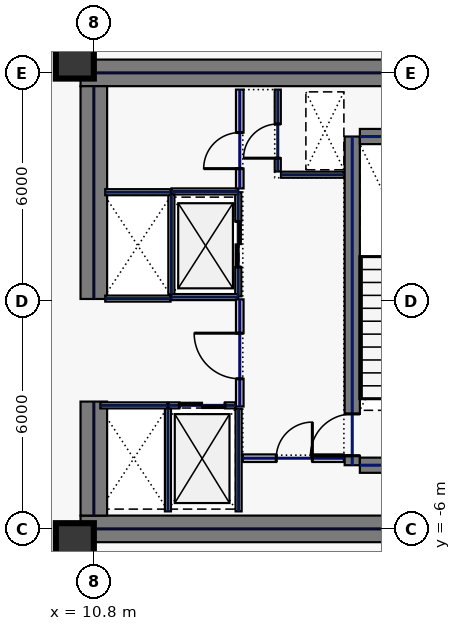
"""IFC4 building model, lengths in metres.
Left out: names, types, materials, properties, quantities, classifications, styles, units other than length and angle.
Written with IfcOpenShell. Run it as: python <this file> out.ifc"""

import sys

from ifc_helpers import new_model, si_unit, direction, frame, frame_2d, origin, origin_2d, place, context, subcontext, project, spatial, rectangle, hollow_rectangle, extrude, element, fill, save


model = new_model("IFC4")
c1 = context("Model", 3, precision=1e-05, world=origin(), true_north=direction((0.0, 1.0)))
c2 = subcontext(c1, "Body", "Model", "MODEL_VIEW")
j1 = project(units=[si_unit("LENGTHUNIT", "METRE"), si_unit("PLANEANGLEUNIT", "RADIAN")], contexts=[c1])
p1 = place(None, origin())
s1 = spatial("IfcSite", under=j1, at=p1, CompositionType="ELEMENT")
p2 = place(p1, origin())
s2 = spatial("IfcBuilding", under=s1, at=p2, CompositionType="ELEMENT")
p3 = place(p2, frame((0.0, 0.0, 97.4)))
s3 = spatial("IfcBuildingStorey", under=s2, at=p3, CompositionType="ELEMENT", Elevation=97.4)
for number, where, z_axis, x_axis in (
    (1, (10.45, 6.0, 0.0), (0.0, 0.0, 1.0), (1.0, 0.0, 0.0)),
    (2, (10.45, -6.0, 0.0), (0.0, 0.0, 1.0), (1.0, 0.0, 0.0)),
):
    element("IfcWall", number, at=place(p3, frame(where, z_axis=z_axis, x_axis=x_axis)), inside=s3, PredefinedType="SHEAR", context=c2, shape_type="SweptSolid", body=[
        extrude(rectangle(XDim=11.55, YDim=0.7, at=frame_2d((5.775, 0.0))), origin(), (0.0, 0.0, 1.0), 3.74),
    ])
p4 = place(p3, frame((10.8, -5.65, 0.0), z_axis=(0.0, 0.0, 1.0), x_axis=(0.0, 1.0, 0.0)))
e3 = element("IfcWall", 3, at=p4, inside=s3, PredefinedType="SHEAR", context=c2, shape_type="SweptSolid", body=[
    extrude(rectangle(XDim=3.0, YDim=0.7, at=frame_2d((1.5, 0.0))), origin(), (0.0, 0.0, 1.0), 3.74),
])
p5 = place(p3, frame((10.8, 0.05, 0.0), z_axis=(0.0, 0.0, 1.0), x_axis=(0.0, 1.0, 0.0)))
e4 = element("IfcWall", 4, at=p5, inside=s3, PredefinedType="SHEAR", context=c2, shape_type="SweptSolid", body=[
    extrude(rectangle(XDim=5.6, YDim=0.7, at=frame_2d((2.8, 0.0))), origin(), (0.0, 0.0, 1.0), 3.74),
])
p6 = place(p3, frame((17.6, -4.325, 0.0), z_axis=(0.0, 0.0, 1.0), x_axis=(0.0, 1.0, 0.0)))
e5 = element("IfcWall", 5, at=p6, inside=s3, PredefinedType="SHEAR", context=c2, shape_type="SweptSolid", body=[
    extrude(rectangle(XDim=8.65, YDim=0.4, at=frame_2d((4.325, 0.0))), origin(), (0.0, 0.0, 1.0), 3.74),
])
p7 = place(p6, frame((0.25, 0.0, 0.0)))
e6 = element("IfcOpeningElement", 6, at=p7, cuts=e5, PredefinedType="OPENING", context=c2, shape_type="SweptSolid", body=[
    extrude(rectangle(XDim=1.1, YDim=2.2, at=frame_2d((0.55, 1.1))), frame((0.0, 0.21, 0.0), z_axis=(0.0, -1.0, 0.0), x_axis=(1.0, 0.0, 0.0)), (0.0, 0.0, 1.0), 0.42),
])
for number, where, z_axis, x_axis in (
    (7, (17.8, -4.325, 0.0), (0.0, 0.0, 1.0), (1.0, 0.0, 0.0)),
    (8, (17.8, 4.325, 0.0), (0.0, 0.0, 1.0), (1.0, 0.0, 0.0)),
):
    element("IfcWall", number, at=place(p3, frame(where, z_axis=z_axis, x_axis=x_axis)), inside=s3, PredefinedType="SHEAR", context=c2, shape_type="SweptSolid", body=[
        extrude(rectangle(XDim=3.4, YDim=0.4, at=frame_2d((1.7, 0.0))), origin(), (0.0, 0.0, 1.0), 3.74),
    ])
for number, where, z_axis, x_axis in (
    (9, (10.3, -6.35, 0.0), (0.0, 0.0, 1.0), (1.0, 0.0, 0.0)),
    (10, (10.3, 6.35, 0.0), (0.0, 0.0, 1.0), (1.0, 0.0, 0.0)),
):
    element("IfcColumn", number, at=place(p3, frame(where, z_axis=z_axis, x_axis=x_axis)), inside=s3, PredefinedType="COLUMN", context=c2, shape_type="SweptSolid", body=[
        extrude(hollow_rectangle(XDim=1.0, YDim=1.0, WallThickness=0.045, at=origin_2d()), origin(), (0.0, 0.0, 1.0), 3.74),
    ])
p8 = place(p3, frame((14.6, 0.12, 0.0), z_axis=(0.0, 0.0, 1.0), x_axis=(0.0, 1.0, 0.0)))
e11 = element("IfcWall", 11, at=p8, inside=s3, PredefinedType="PARTITIONING", context=c2, shape_type="SweptSolid", body=[
    extrude(rectangle(XDim=2.74, YDim=0.16, at=frame_2d((1.37, 0.0))), origin(), (0.0, 0.0, 1.0), 3.74),
])
p9 = place(p8, frame((0.77, 0.0, 0.0)))
e12 = element("IfcOpeningElement", 12, at=p9, cuts=e11, PredefinedType="OPENING", context=c2, shape_type="SweptSolid", body=[
    extrude(rectangle(XDim=1.2, YDim=2.2, at=frame_2d((0.6, 1.1))), frame((0.0, 0.09, 0.0), z_axis=(0.0, -1.0, 0.0), x_axis=(1.0, 0.0, 0.0)), (0.0, 0.0, 1.0), 0.18),
])
for number, where, z_axis, x_axis in (
    (13, (12.84, 0.1, 0.0), (0.0, 0.0, 1.0), (1.0, 0.0, 0.0)),
    (14, (12.84, 2.88, 0.0), (0.0, 0.0, 1.0), (1.0, 0.0, 0.0)),
):
    element("IfcWall", number, at=place(p3, frame(where, z_axis=z_axis, x_axis=x_axis)), inside=s3, PredefinedType="PARTITIONING", context=c2, shape_type="SweptSolid", body=[
        extrude(rectangle(XDim=1.76, YDim=0.16, at=frame_2d((0.88, 0.0))), origin(), (0.0, 0.0, 1.0), 3.74),
    ])
p10 = place(p3, frame((12.84, 0.18, 0.0), z_axis=(0.0, 0.0, 1.0), x_axis=(0.0, 1.0, 0.0)))
e15 = element("IfcWall", 15, at=p10, inside=s3, PredefinedType="PARTITIONING", context=c2, shape_type="SweptSolid", body=[
    extrude(rectangle(XDim=2.62, YDim=0.16, at=frame_2d((1.31, 0.0))), origin(), (0.0, 0.0, 1.0), 3.74),
])
p11 = place(p3, frame((12.77, -2.75, 0.0), z_axis=(0.0, 0.0, 1.0), x_axis=(1.0, 0.0, 0.0)))
e16 = element("IfcWall", 16, at=p11, inside=s3, PredefinedType="PARTITIONING", context=c2, shape_type="SweptSolid", body=[
    extrude(rectangle(XDim=1.76, YDim=0.16, at=frame_2d((0.88, 0.0))), origin(), (0.0, 0.0, 1.0), 3.74),
])
p12 = place(p11, frame((0.28, 0.0, 0.0)))
e17 = element("IfcOpeningElement", 17, at=p12, cuts=e16, PredefinedType="OPENING", context=c2, shape_type="SweptSolid", body=[
    extrude(rectangle(XDim=1.2, YDim=2.2, at=frame_2d((0.6, 1.1))), frame((0.0, 0.09, 0.0), z_axis=(0.0, -1.0, 0.0), x_axis=(1.0, 0.0, 0.0)), (0.0, 0.0, 1.0), 0.18),
])
for number, where, z_axis, x_axis in (
    (18, (12.75, -5.54, 0.0), (0.0, 0.0, 1.0), (0.0, 1.0, 0.0)),
    (19, (14.61, -5.54, 0.0), (0.0, 0.0, 1.0), (0.0, 1.0, 0.0)),
):
    element("IfcWall", number, at=place(p3, frame(where, z_axis=z_axis, x_axis=x_axis)), inside=s3, PredefinedType="PARTITIONING", context=c2, shape_type="SweptSolid", body=[
        extrude(rectangle(XDim=2.7, YDim=0.16, at=frame_2d((1.35, 0.0))), origin(), (0.0, 0.0, 1.0), 3.74),
    ])
p13 = place(p3, frame((10.97, -2.75, 0.0), z_axis=(0.0, 0.0, 1.0), x_axis=(1.0, 0.0, 0.0)))
e20 = element("IfcWall", 20, at=p13, inside=s3, PredefinedType="PARTITIONING", context=c2, shape_type="SweptSolid", body=[
    extrude(rectangle(XDim=1.76, YDim=0.16, at=frame_2d((0.88, 0.0))), origin(), (0.0, 0.0, 1.0), 3.74),
])
for number, where, z_axis, x_axis in (
    (21, (11.1, 0.06, 0.0), (0.0, 0.0, 1.0), (1.0, 0.0, 0.0)),
    (22, (11.1, 2.86, 0.0), (0.0, 0.0, 1.0), (1.0, 0.0, 0.0)),
):
    element("IfcWall", number, at=place(p3, frame(where, z_axis=z_axis, x_axis=x_axis)), inside=s3, PredefinedType="PARTITIONING", context=c2, shape_type="SweptSolid", body=[
        extrude(rectangle(XDim=1.72, YDim=0.16, at=frame_2d((0.86, 0.0))), origin(), (0.0, 0.0, 1.0), 3.74),
    ])
p14 = place(p3, frame((15.64, 3.405, 0.0), z_axis=(0.0, 0.0, 1.0), x_axis=(0.0, 1.0, 0.0)))
e23 = element("IfcWall", 23, at=p14, inside=s3, PredefinedType="PARTITIONING", context=c2, shape_type="SweptSolid", body=[
    extrude(rectangle(XDim=2.155, YDim=0.16, at=frame_2d((1.078, 0.0))), origin(), (0.0, 0.0, 1.0), 3.74),
])
p15 = place(p14, frame((0.35, 0.0, 0.0)))
e24 = element("IfcOpeningElement", 24, at=p15, cuts=e23, PredefinedType="OPENING", context=c2, shape_type="SweptSolid", body=[
    extrude(rectangle(XDim=0.9, YDim=2.2, at=frame_2d((0.45, 1.1))), frame((0.0, 0.09, 0.0), z_axis=(0.0, -1.0, 0.0), x_axis=(1.0, 0.0, 0.0)), (0.0, 0.0, 1.0), 0.18),
])
p16 = place(p3, frame((15.725, 3.32, 0.0), z_axis=(0.0, 0.0, 1.0), x_axis=(1.0, 0.0, 0.0)))
e25 = element("IfcWall", 25, at=p16, inside=s3, PredefinedType="PARTITIONING", context=c2, shape_type="SweptSolid", body=[
    extrude(rectangle(XDim=1.655, YDim=0.16, at=frame_2d((0.827, 0.0))), origin(), (0.0, 0.0, 1.0), 3.74),
])
p17 = place(p3, frame((14.72, -4.14, 0.0), z_axis=(0.0, 0.0, 1.0), x_axis=(1.0, 0.0, 0.0)))
e26 = element("IfcWall", 26, at=p17, inside=s3, PredefinedType="SOLIDWALL", context=c2, shape_type="SweptSolid", body=[
    extrude(rectangle(XDim=2.66, YDim=0.2, at=frame_2d((1.33, 0.0))), origin(), (0.0, 0.0, 1.0), 3.74),
])
p18 = place(p17, frame((0.88, 0.0, 0.0)))
e27 = element("IfcOpeningElement", 27, at=p18, cuts=e26, PredefinedType="OPENING", context=c2, shape_type="SweptSolid", body=[
    extrude(rectangle(XDim=0.95, YDim=2.2, at=frame_2d((0.475, 1.1))), frame((0.0, 0.11, 0.0), z_axis=(0.0, -1.0, 0.0), x_axis=(1.0, 0.0, 0.0)), (0.0, 0.0, 1.0), 0.22),
])
p19 = place(p3, frame((14.64, 2.96, 0.0), z_axis=(0.0, 0.0, 1.0), x_axis=(0.0, 1.0, 0.0)))
e28 = element("IfcWall", 28, at=p19, inside=s3, PredefinedType="SOLIDWALL", context=c2, shape_type="SweptSolid", body=[
    extrude(rectangle(XDim=2.6, YDim=0.2, at=frame_2d((1.3, 0.0))), origin(), (0.0, 0.0, 1.0), 3.74),
])
p20 = place(p19, frame((0.52, 0.0, 0.0)))
e29 = element("IfcOpeningElement", 29, at=p20, cuts=e28, PredefinedType="OPENING", context=c2, shape_type="SweptSolid", body=[
    extrude(rectangle(XDim=0.95, YDim=2.2, at=frame_2d((0.475, 1.1))), frame((0.0, 0.11, 0.0), z_axis=(0.0, -1.0, 0.0), x_axis=(1.0, 0.0, 0.0)), (0.0, 0.0, 1.0), 0.22),
])
p21 = place(p3, frame((14.64, -2.78, 0.0), z_axis=(0.0, 0.0, 1.0), x_axis=(0.0, 1.0, 0.0)))
e30 = element("IfcWall", 30, at=p21, inside=s3, PredefinedType="SOLIDWALL", context=c2, shape_type="SweptSolid", body=[
    extrude(rectangle(XDim=2.82, YDim=0.2, at=frame_2d((1.41, 0.0))), origin(), (0.0, 0.0, 1.0), 3.74),
])
p22 = place(p21, frame((0.73, 0.0, 0.0)))
e31 = element("IfcOpeningElement", 31, at=p22, cuts=e30, PredefinedType="OPENING", context=c2, shape_type="SweptSolid", body=[
    extrude(rectangle(XDim=1.2, YDim=2.2, at=frame_2d((0.6, 1.1))), frame((0.0, 0.11, 0.0), z_axis=(0.0, -1.0, 0.0), x_axis=(1.0, 0.0, 0.0)), (0.0, 0.0, 1.0), 0.22),
])
p23 = place(p3, frame((10.58, 7.185, 0.0), z_axis=(0.0, 0.0, 1.0), x_axis=(0.0, -1.0, 0.0)))
e32 = element("IfcWall", 32, at=p23, inside=s3, PredefinedType="PARTITIONING", context=c2, shape_type="SweptSolid", body=[
    extrude(rectangle(XDim=0.765, YDim=0.16, at=frame_2d((0.383, 0.0))), origin(), (0.0, 0.0, 1.0), 3.74),
])
p24 = place(p3, frame((10.58, -6.42, 0.0), z_axis=(0.0, 0.0, 1.0), x_axis=(0.0, -1.0, 0.0)))
e33 = element("IfcWall", 33, at=p24, inside=s3, PredefinedType="PARTITIONING", context=c2, shape_type="SweptSolid", body=[
    extrude(rectangle(XDim=0.565, YDim=0.16, at=frame_2d((0.283, 0.0))), origin(), (0.0, 0.0, 1.0), 3.74),
])
p25 = place(p7, origin())
e34 = element("IfcDoor", 34, at=p25, inside=s3, OperationType="SINGLE_SWING_LEFT", PredefinedType="DOOR", context=c2, shape_type="SweptSolid", body=[
    extrude(rectangle(XDim=1.1, YDim=2.2, at=frame_2d((0.55, 1.1))), frame((0.0, 0.025, 0.0), z_axis=(0.0, -1.0, 0.0), x_axis=(1.0, 0.0, 0.0)), (0.0, 0.0, 1.0), 0.05),
])
fill(e6, e34)
p26 = place(p9, origin())
e35 = element("IfcDoor", 35, at=p26, inside=s3, OperationType="SLIDING_TO_LEFT", PredefinedType="DOOR", context=c2, shape_type="SweptSolid", body=[
    extrude(rectangle(XDim=1.2, YDim=2.2, at=frame_2d((0.6, 1.1))), frame((0.0, 0.025, 0.0), z_axis=(0.0, -1.0, 0.0), x_axis=(1.0, 0.0, 0.0)), (0.0, 0.0, 1.0), 0.05),
])
fill(e12, e35)
p27 = place(p12, origin())
e36 = element("IfcDoor", 36, at=p27, inside=s3, OperationType="SLIDING_TO_LEFT", PredefinedType="DOOR", context=c2, shape_type="SweptSolid", body=[
    extrude(rectangle(XDim=1.2, YDim=2.2, at=frame_2d((0.6, 1.1))), frame((0.0, 0.025, 0.0), z_axis=(0.0, -1.0, 0.0), x_axis=(1.0, 0.0, 0.0)), (0.0, 0.0, 1.0), 0.05),
])
fill(e17, e36)
p28 = place(p15, origin())
e37 = element("IfcDoor", 37, at=p28, inside=s3, OperationType="SINGLE_SWING_LEFT", PredefinedType="DOOR", context=c2, shape_type="SweptSolid", body=[
    extrude(rectangle(XDim=0.9, YDim=2.2, at=frame_2d((0.45, 1.1))), frame((0.0, 0.025, 0.0), z_axis=(0.0, -1.0, 0.0), x_axis=(1.0, 0.0, 0.0)), (0.0, 0.0, 1.0), 0.05),
])
fill(e24, e37)
p29 = place(p18, origin())
e38 = element("IfcDoor", 38, at=p29, inside=s3, OperationType="SINGLE_SWING_RIGHT", PredefinedType="DOOR", context=c2, shape_type="SweptSolid", body=[
    extrude(rectangle(XDim=0.95, YDim=2.2, at=frame_2d((0.475, 1.1))), frame((0.0, 0.025, 0.0), z_axis=(0.0, -1.0, 0.0), x_axis=(1.0, 0.0, 0.0)), (0.0, 0.0, 1.0), 0.05),
])
fill(e27, e38)
p30 = place(p20, origin())
e39 = element("IfcDoor", 39, at=p30, inside=s3, OperationType="SINGLE_SWING_LEFT", PredefinedType="DOOR", context=c2, shape_type="SweptSolid", body=[
    extrude(rectangle(XDim=0.95, YDim=2.2, at=frame_2d((0.475, 1.1))), frame((0.0, 0.025, 0.0), z_axis=(0.0, -1.0, 0.0), x_axis=(1.0, 0.0, 0.0)), (0.0, 0.0, 1.0), 0.05),
])
fill(e29, e39)
p31 = place(p22, origin())
e40 = element("IfcDoor", 40, at=p31, inside=s3, OperationType="SINGLE_SWING_RIGHT", PredefinedType="DOOR", context=c2, shape_type="SweptSolid", body=[
    extrude(rectangle(XDim=1.2, YDim=2.2, at=frame_2d((0.6, 1.1))), frame((0.0, 0.025, 0.0), z_axis=(0.0, -1.0, 0.0), x_axis=(1.0, 0.0, 0.0)), (0.0, 0.0, 1.0), 0.05),
])
fill(e31, e40)
save(model, sys.argv[1])
